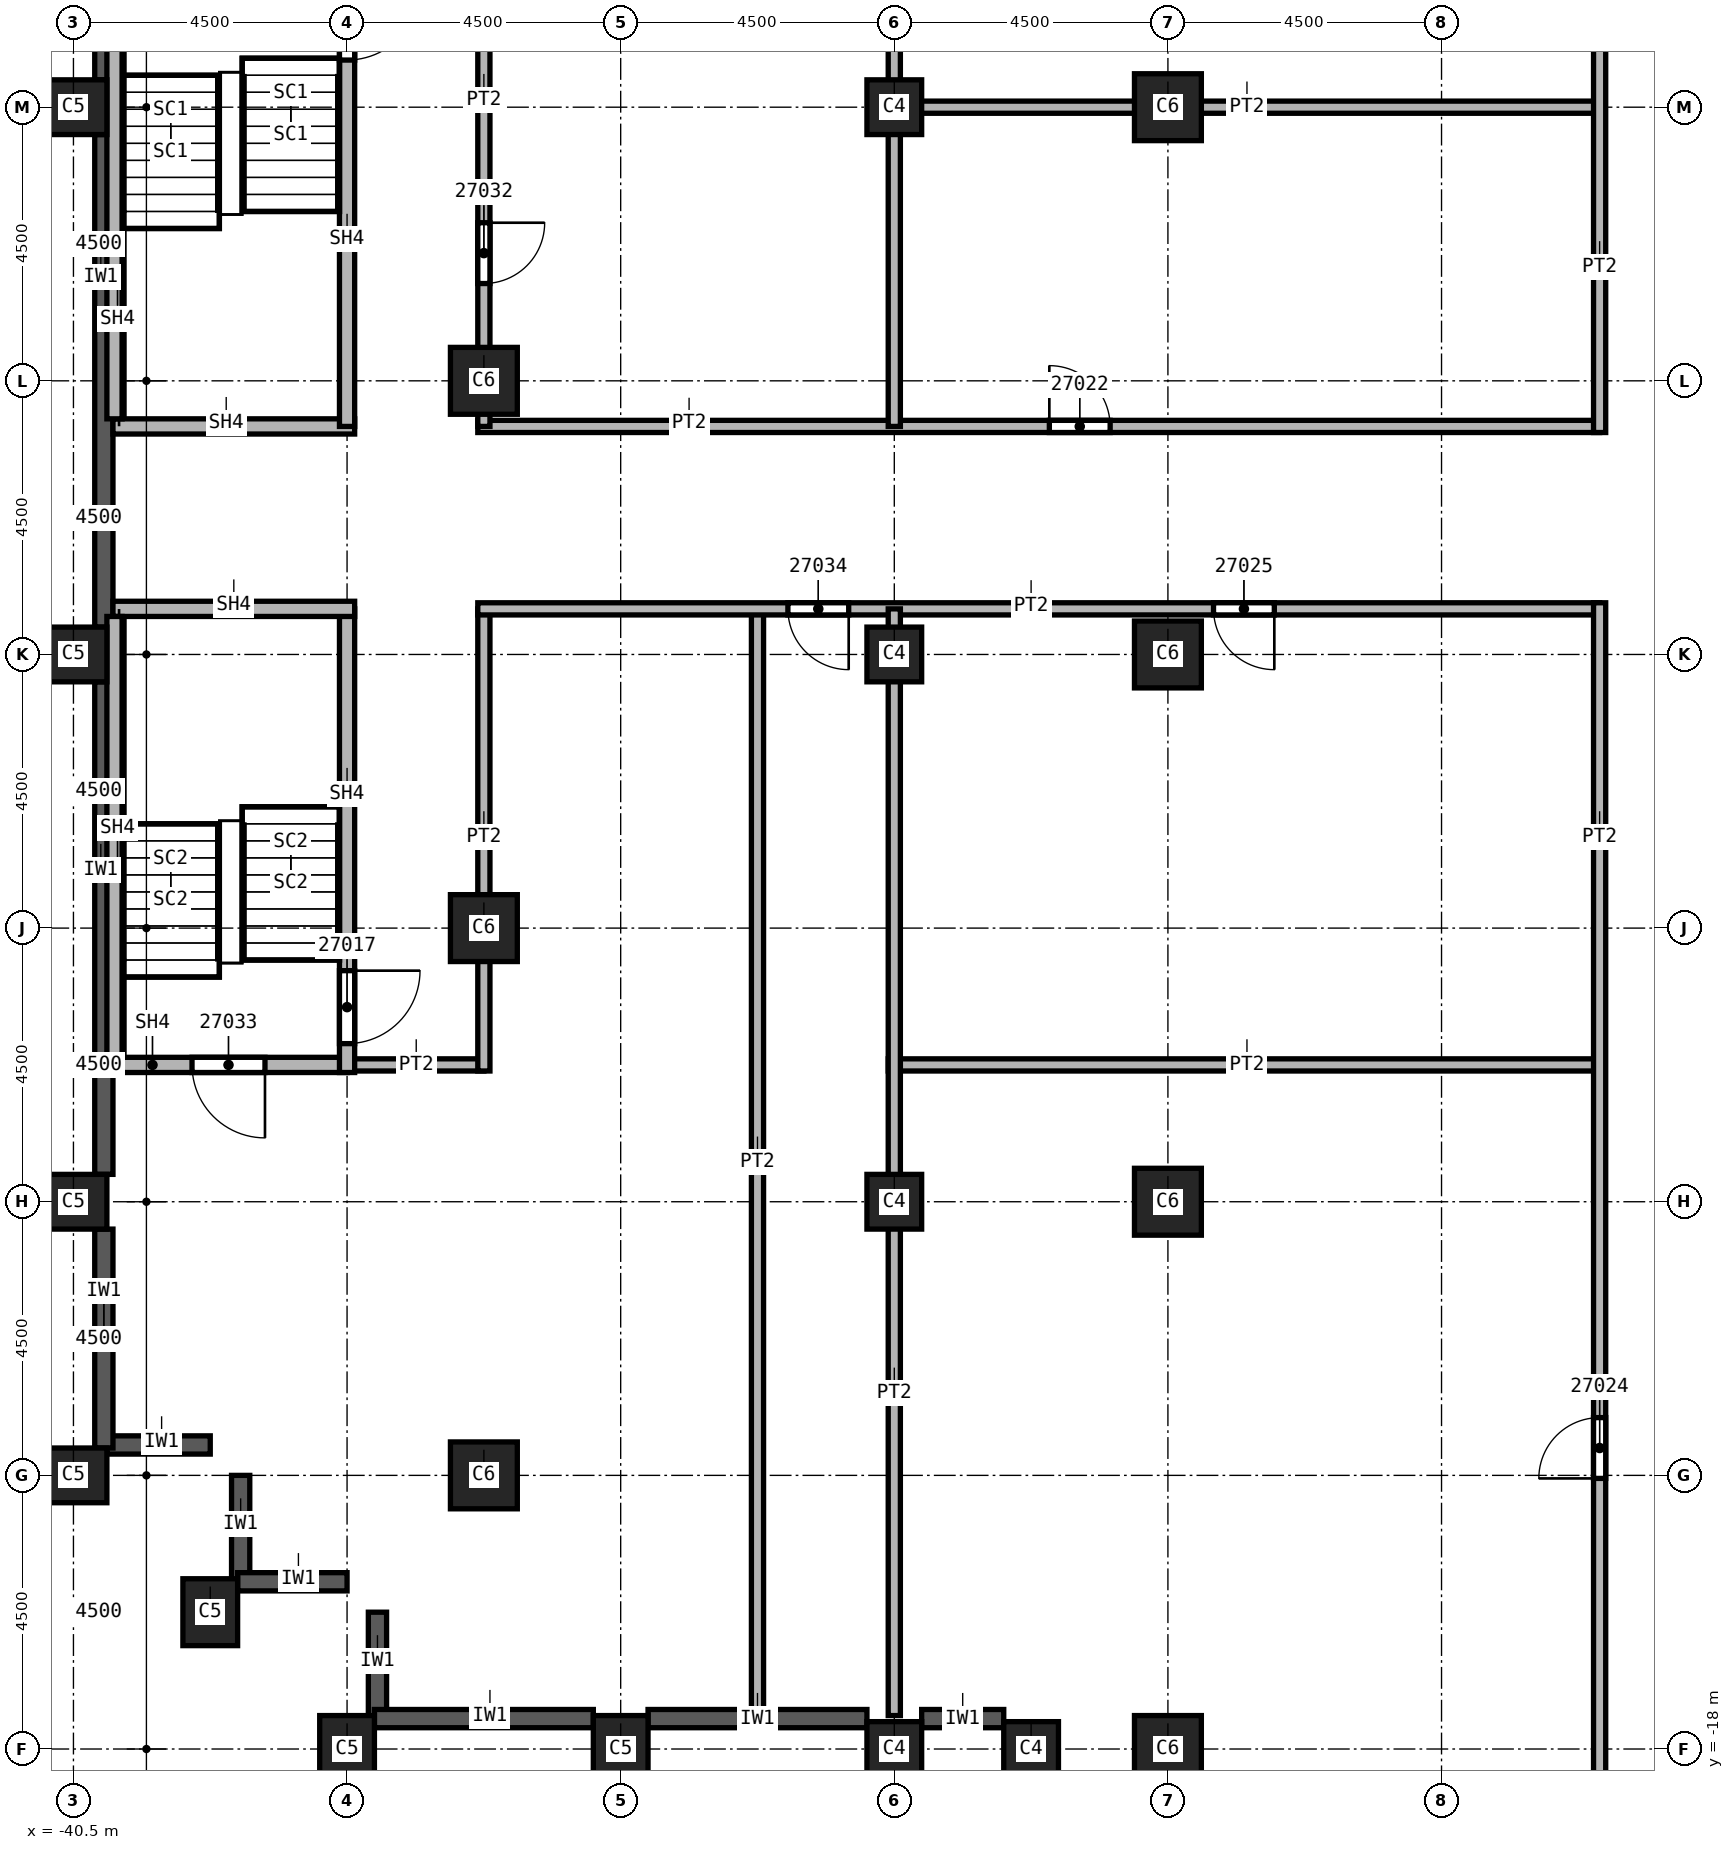
"""IFC4 building model, lengths in metres.
Left out: names, types, materials, properties, quantities, classifications, styles, units other than length and angle.
Written with IfcOpenShell. Run it as: python <this file> out.ifc"""

import sys

from ifc_helpers import new_model, si_unit, direction, frame, frame_2d, origin, origin_2d, place, context, subcontext, project, spatial, rectangle, extrude, element, fill, save


model = new_model("IFC4")
c1 = context("Model", 3, precision=1e-05, world=origin(), true_north=direction((0.0, 1.0)))
c2 = subcontext(c1, "Body", "Model", "MODEL_VIEW")
j1 = project(units=[si_unit("LENGTHUNIT", "METRE"), si_unit("PLANEANGLEUNIT", "RADIAN")], contexts=[c1])
p1 = place(None, origin())
s1 = spatial("IfcSite", under=j1, at=p1, CompositionType="ELEMENT")
p2 = place(p1, origin())
s2 = spatial("IfcBuilding", under=s1, at=p2, CompositionType="ELEMENT")
p3 = place(p2, frame((0.0, 0.0, 178.0)))
s3 = spatial("IfcBuildingStorey", under=s2, at=p3, CompositionType="ELEMENT", Elevation=178.0)
for number, where, z_axis, x_axis in (
    (1, (-40.5, 0.0, 0.0), (0.0, 0.0, 1.0), (0.0, 1.0, 0.0)),
    (2, (-40.5, 9.0, 0.0), (0.0, 0.0, 1.0), (0.0, 1.0, 0.0)),
    (3, (-40.5, -9.0, 0.0), (0.0, 0.0, 1.0), (0.0, 1.0, 0.0)),
    (4, (-40.5, -13.5, 0.0), (0.0, 0.0, 1.0), (0.0, 1.0, 0.0)),
    (5, (-38.25, -15.75, 0.0), (0.0, 0.0, 1.0), (1.0, 0.0, 0.0)),
    (6, (-31.5, -18.0, 0.0), (0.0, 0.0, 1.0), (1.0, 0.0, 0.0)),
    (7, (-36.0, -18.0, 0.0), (0.0, 0.0, 1.0), (1.0, 0.0, 0.0)),
):
    element("IfcColumn", number, at=place(p3, frame(where, z_axis=z_axis, x_axis=x_axis)), inside=s3, PredefinedType="COLUMN", context=c2, shape_type="SweptSolid", body=[
        extrude(rectangle(XDim=0.9, YDim=1.1, at=origin_2d()), origin(), (0.0, 0.0, 1.0), 5.72),
    ])
for number, where, z_axis, x_axis in (
    (8, (-33.75, 4.5, 0.0), (0.0, 0.0, 1.0), (1.0, 0.0, 0.0)),
    (9, (-33.75, -4.5, 0.0), (0.0, 0.0, 1.0), (1.0, 0.0, 0.0)),
    (10, (-33.75, -13.5, 0.0), (0.0, 0.0, 1.0), (1.0, 0.0, 0.0)),
    (11, (-22.5, 0.0, 0.0), (0.0, 0.0, 1.0), (1.0, 0.0, 0.0)),
    (12, (-22.5, 9.0, 0.0), (0.0, 0.0, 1.0), (1.0, 0.0, 0.0)),
    (13, (-22.5, -9.0, 0.0), (0.0, 0.0, 1.0), (1.0, 0.0, 0.0)),
    (14, (-22.5, -18.0, 0.0), (0.0, 0.0, 1.0), (1.0, 0.0, 0.0)),
):
    element("IfcColumn", number, at=place(p3, frame(where, z_axis=z_axis, x_axis=x_axis)), inside=s3, PredefinedType="COLUMN", context=c2, shape_type="SweptSolid", body=[
        extrude(rectangle(XDim=1.1, YDim=1.1, at=origin_2d()), origin(), (0.0, 0.0, 1.0), 5.72),
    ])
for number, where, z_axis, x_axis in (
    (15, (-27.0, 0.0, 0.0), (0.0, 0.0, 1.0), (1.0, 0.0, 0.0)),
    (16, (-27.0, 9.0, 0.0), (0.0, 0.0, 1.0), (1.0, 0.0, 0.0)),
    (17, (-27.0, -9.0, 0.0), (0.0, 0.0, 1.0), (1.0, 0.0, 0.0)),
    (18, (-27.0, -18.0, 0.0), (0.0, 0.0, 1.0), (1.0, 0.0, 0.0)),
    (19, (-24.75, -18.0, 0.0), (0.0, 0.0, 1.0), (1.0, 0.0, 0.0)),
):
    element("IfcColumn", number, at=place(p3, frame(where, z_axis=z_axis, x_axis=x_axis)), inside=s3, PredefinedType="COLUMN", context=c2, shape_type="SweptSolid", body=[
        extrude(rectangle(XDim=0.9, YDim=0.9, at=origin_2d()), origin(), (0.0, 0.0, 1.0), 5.72),
    ])
p4 = place(p3, frame((-39.95, -13.0, 0.0), z_axis=(0.0, 0.0, 1.0), x_axis=(1.0, 0.0, 0.0)))
e20 = element("IfcWall", 20, at=p4, inside=s3, PredefinedType="SOLIDWALL", context=c2, shape_type="SweptSolid", body=[
    extrude(rectangle(XDim=1.7, YDim=0.3, at=frame_2d((0.85, 0.0))), origin(), (0.0, 0.0, 1.0), 5.12),
])
for number, where, z_axis, x_axis in (
    (21, (-37.75, -15.3, 0.0), (0.0, 0.0, 1.0), (0.0, 1.0, 0.0)),
    (22, (-37.8, -15.25, 0.0), (0.0, 0.0, 1.0), (1.0, 0.0, 0.0)),
    (23, (-35.5, -17.55, 0.0), (0.0, 0.0, 1.0), (0.0, 1.0, 0.0)),
):
    element("IfcWall", number, at=place(p3, frame(where, z_axis=z_axis, x_axis=x_axis)), inside=s3, PredefinedType="SOLIDWALL", context=c2, shape_type="SweptSolid", body=[
        extrude(rectangle(XDim=1.8, YDim=0.3, at=frame_2d((0.9, 0.0))), origin(), (0.0, 0.0, 1.0), 5.12),
    ])
p5 = place(p3, frame((-40.0, 13.05, 0.0), z_axis=(0.0, 0.0, 1.0), x_axis=(0.0, -1.0, 0.0)))
e24 = element("IfcWall", 24, at=p5, inside=s3, PredefinedType="SOLIDWALL", context=c2, shape_type="SweptSolid", body=[
    extrude(rectangle(XDim=3.6, YDim=0.3, at=frame_2d((1.8, 0.0))), origin(), (0.0, 0.0, 1.0), 5.12),
])
for number, where, z_axis, x_axis in (
    (25, (-40.0, 8.55, 0.0), (0.0, 0.0, 1.0), (0.0, -1.0, 0.0)),
    (26, (-40.0, -0.45, 0.0), (0.0, 0.0, 1.0), (0.0, -1.0, 0.0)),
):
    element("IfcWall", number, at=place(p3, frame(where, z_axis=z_axis, x_axis=x_axis)), inside=s3, PredefinedType="SOLIDWALL", context=c2, shape_type="SweptSolid", body=[
        extrude(rectangle(XDim=8.1, YDim=0.3, at=frame_2d((4.05, 0.0))), origin(), (0.0, 0.0, 1.0), 5.12),
    ])
for number, where, z_axis, x_axis in (
    (27, (-40.0, -9.45, 0.0), (0.0, 0.0, 1.0), (0.0, -1.0, 0.0)),
    (28, (-35.55, -17.5, 0.0), (0.0, 0.0, 1.0), (1.0, 0.0, 0.0)),
    (29, (-31.05, -17.5, 0.0), (0.0, 0.0, 1.0), (1.0, 0.0, 0.0)),
):
    element("IfcWall", number, at=place(p3, frame(where, z_axis=z_axis, x_axis=x_axis)), inside=s3, PredefinedType="SOLIDWALL", context=c2, shape_type="SweptSolid", body=[
        extrude(rectangle(XDim=3.6, YDim=0.3, at=frame_2d((1.8, 0.0))), origin(), (0.0, 0.0, 1.0), 5.12),
    ])
p6 = place(p3, frame((-26.55, -17.5, 0.0), z_axis=(0.0, 0.0, 1.0), x_axis=(1.0, 0.0, 0.0)))
e30 = element("IfcWall", 30, at=p6, inside=s3, PredefinedType="SOLIDWALL", context=c2, shape_type="SweptSolid", body=[
    extrude(rectangle(XDim=1.35, YDim=0.3, at=frame_2d((0.675, 0.0))), origin(), (0.0, 0.0, 1.0), 5.12),
])
p7 = place(p3, frame((-33.85, 3.75, 0.0), z_axis=(0.0, 0.0, 1.0), x_axis=(1.0, 0.0, 0.0)))
e31 = element("IfcWall", 31, at=p7, inside=s3, PredefinedType="PARTITIONING", context=c2, shape_type="SweptSolid", body=[
    extrude(rectangle(XDim=18.45, YDim=0.2, at=frame_2d((9.225, 0.0))), origin(), (0.0, 0.0, 1.0), 5.72),
])
p8 = place(p7, frame((9.4, 0.0, 0.0)))
e32 = element("IfcOpeningElement", 32, at=p8, cuts=e31, PredefinedType="OPENING", context=c2, shape_type="SweptSolid", body=[
    extrude(rectangle(XDim=1.0, YDim=2.1, at=frame_2d((0.5, 1.05))), frame((0.0, 0.1, 0.0), z_axis=(0.0, -1.0, 0.0), x_axis=(1.0, 0.0, 0.0)), (0.0, 0.0, 1.0), 0.2),
])
p9 = place(p3, frame((-33.75, -6.75, 0.0), z_axis=(0.0, 0.0, 1.0), x_axis=(-1.0, 0.0, 0.0)))
e33 = element("IfcWall", 33, at=p9, inside=s3, PredefinedType="PARTITIONING", context=c2, shape_type="SweptSolid", body=[
    extrude(rectangle(XDim=2.25, YDim=0.2, at=frame_2d((1.125, 0.0))), origin(), (0.0, 0.0, 1.0), 5.72),
])
p10 = place(p3, frame((-33.75, 0.75, 0.0), z_axis=(0.0, 0.0, 1.0), x_axis=(0.0, -1.0, 0.0)))
e34 = element("IfcWall", 34, at=p10, inside=s3, PredefinedType="PARTITIONING", context=c2, shape_type="SweptSolid", body=[
    extrude(rectangle(XDim=7.6, YDim=0.2, at=frame_2d((3.8, 0.0))), origin(), (0.0, 0.0, 1.0), 5.72),
])
p11 = place(p3, frame((-33.75, 11.25, 0.0), z_axis=(0.0, 0.0, 1.0), x_axis=(0.0, -1.0, 0.0)))
e35 = element("IfcWall", 35, at=p11, inside=s3, PredefinedType="PARTITIONING", context=c2, shape_type="SweptSolid", body=[
    extrude(rectangle(XDim=7.5, YDim=0.2, at=frame_2d((3.75, 0.0))), origin(), (0.0, 0.0, 1.0), 5.72),
])
p12 = place(p11, frame((4.15, 0.0, 0.0)))
e36 = element("IfcOpeningElement", 36, at=p12, cuts=e35, PredefinedType="OPENING", context=c2, shape_type="SweptSolid", body=[
    extrude(rectangle(XDim=1.0, YDim=2.1, at=frame_2d((0.5, 1.05))), frame((0.0, 0.1, 0.0), z_axis=(0.0, -1.0, 0.0), x_axis=(1.0, 0.0, 0.0)), (0.0, 0.0, 1.0), 0.2),
])
p13 = place(p3, frame((-29.25, 0.75, 0.0), z_axis=(0.0, 0.0, 1.0), x_axis=(0.0, -1.0, 0.0)))
e37 = element("IfcWall", 37, at=p13, inside=s3, PredefinedType="PARTITIONING", context=c2, shape_type="SweptSolid", body=[
    extrude(rectangle(XDim=18.1, YDim=0.2, at=frame_2d((9.05, 0.0))), origin(), (0.0, 0.0, 1.0), 5.72),
])
p14 = place(p3, frame((-15.4, 0.75, 0.0), z_axis=(0.0, 0.0, 1.0), x_axis=(-1.0, 0.0, 0.0)))
e38 = element("IfcWall", 38, at=p14, inside=s3, PredefinedType="PARTITIONING", context=c2, shape_type="SweptSolid", body=[
    extrude(rectangle(XDim=18.45, YDim=0.2, at=frame_2d((9.225, 0.0))), origin(), (0.0, 0.0, 1.0), 5.72),
])
p15 = place(p14, frame((5.35, 0.0, 0.0)))
e39 = element("IfcOpeningElement", 39, at=p15, cuts=e38, PredefinedType="OPENING", context=c2, shape_type="SweptSolid", body=[
    extrude(rectangle(XDim=1.0, YDim=2.1, at=frame_2d((0.5, 1.05))), frame((0.0, 0.1, 0.0), z_axis=(0.0, -1.0, 0.0), x_axis=(1.0, 0.0, 0.0)), (0.0, 0.0, 1.0), 0.2),
])
p16 = place(p14, frame((12.35, 0.0, 0.0)))
e40 = element("IfcOpeningElement", 40, at=p16, cuts=e38, PredefinedType="OPENING", context=c2, shape_type="SweptSolid", body=[
    extrude(rectangle(XDim=1.0, YDim=2.1, at=frame_2d((0.5, 1.05))), frame((0.0, 0.1, 0.0), z_axis=(0.0, -1.0, 0.0), x_axis=(1.0, 0.0, 0.0)), (0.0, 0.0, 1.0), 0.2),
])
for number, where, z_axis, x_axis in (
    (41, (-27.1, -6.75, 0.0), (0.0, 0.0, 1.0), (1.0, 0.0, 0.0)),
    (42, (-27.1, 9.0, 0.0), (0.0, 0.0, 1.0), (1.0, 0.0, 0.0)),
):
    element("IfcWall", number, at=place(p3, frame(where, z_axis=z_axis, x_axis=x_axis)), inside=s3, PredefinedType="PARTITIONING", context=c2, shape_type="SweptSolid", body=[
        extrude(rectangle(XDim=11.7, YDim=0.2, at=frame_2d((5.85, 0.0))), origin(), (0.0, 0.0, 1.0), 5.72),
    ])
p17 = place(p3, frame((-27.0, -17.45, 0.0), z_axis=(0.0, 0.0, 1.0), x_axis=(0.0, 1.0, 0.0)))
e43 = element("IfcWall", 43, at=p17, inside=s3, PredefinedType="PARTITIONING", context=c2, shape_type="SweptSolid", body=[
    extrude(rectangle(XDim=18.2, YDim=0.2, at=frame_2d((9.1, 0.0))), origin(), (0.0, 0.0, 1.0), 5.72),
])
p18 = place(p3, frame((-27.0, 3.75, 0.0), z_axis=(0.0, 0.0, 1.0), x_axis=(0.0, 1.0, 0.0)))
e44 = element("IfcWall", 44, at=p18, inside=s3, PredefinedType="PARTITIONING", context=c2, shape_type="SweptSolid", body=[
    extrude(rectangle(XDim=13.7, YDim=0.2, at=frame_2d((6.85, 0.0))), origin(), (0.0, 0.0, 1.0), 5.72),
])
p19 = place(p3, frame((-15.4, -22.95, 0.0), z_axis=(0.0, 0.0, 1.0), x_axis=(0.0, 1.0, 0.0)))
e45 = element("IfcWall", 45, at=p19, inside=s3, PredefinedType="PARTITIONING", context=c2, shape_type="SweptSolid", body=[
    extrude(rectangle(XDim=23.8, YDim=0.2, at=frame_2d((11.9, 0.0))), origin(), (0.0, 0.0, 1.0), 5.72),
])
p20 = place(p19, frame((9.4, 0.0, 0.0)))
e46 = element("IfcOpeningElement", 46, at=p20, cuts=e45, PredefinedType="OPENING", context=c2, shape_type="SweptSolid", body=[
    extrude(rectangle(XDim=1.0, YDim=2.1, at=frame_2d((0.5, 1.05))), frame((0.0, 0.1, 0.0), z_axis=(0.0, -1.0, 0.0), x_axis=(1.0, 0.0, 0.0)), (0.0, 0.0, 1.0), 0.2),
])
p21 = place(p3, frame((-15.4, 3.65, 0.0), z_axis=(0.0, 0.0, 1.0), x_axis=(0.0, 1.0, 0.0)))
e47 = element("IfcWall", 47, at=p21, inside=s3, PredefinedType="PARTITIONING", context=c2, shape_type="SweptSolid", body=[
    extrude(rectangle(XDim=9.95, YDim=0.2, at=frame_2d((4.975, 0.0))), origin(), (0.0, 0.0, 1.0), 5.72),
])
p22 = place(p3, frame((-39.85, 3.75, 0.0), z_axis=(0.0, 0.0, 1.0), x_axis=(1.0, 0.0, 0.0)))
e48 = element("IfcWall", 48, at=p22, inside=s3, PredefinedType="SOLIDWALL", context=c2, shape_type="SweptSolid", body=[
    extrude(rectangle(XDim=3.975, YDim=0.25, at=frame_2d((1.988, 0.0))), origin(), (0.0, 0.0, 1.0), 5.72),
])
p23 = place(p3, frame((-36.0, -6.75, 0.0), z_axis=(0.0, 0.0, 1.0), x_axis=(-1.0, 0.0, 0.0)))
e49 = element("IfcWall", 49, at=p23, inside=s3, PredefinedType="SOLIDWALL", context=c2, shape_type="SweptSolid", body=[
    extrude(rectangle(XDim=3.85, YDim=0.25, at=frame_2d((1.925, 0.0))), origin(), (0.0, 0.0, 1.0), 5.72),
])
p24 = place(p23, frame((1.35, 0.0, 0.0)))
e50 = element("IfcOpeningElement", 50, at=p24, cuts=e49, PredefinedType="OPENING", context=c2, shape_type="SweptSolid", body=[
    extrude(rectangle(XDim=1.2, YDim=2.1, at=frame_2d((0.6, 1.05))), frame((0.0, 0.125, 0.0), z_axis=(0.0, -1.0, 0.0), x_axis=(1.0, 0.0, 0.0)), (0.0, 0.0, 1.0), 0.25),
])
p25 = place(p3, frame((-36.0, 0.75, 0.0), z_axis=(0.0, 0.0, 1.0), x_axis=(0.0, -1.0, 0.0)))
e51 = element("IfcWall", 51, at=p25, inside=s3, PredefinedType="SOLIDWALL", context=c2, shape_type="SweptSolid", body=[
    extrude(rectangle(XDim=7.625, YDim=0.25, at=frame_2d((3.812, 0.0))), origin(), (0.0, 0.0, 1.0), 5.72),
])
p26 = place(p25, frame((5.95, 0.0, 0.0)))
e52 = element("IfcOpeningElement", 52, at=p26, cuts=e51, PredefinedType="OPENING", context=c2, shape_type="SweptSolid", body=[
    extrude(rectangle(XDim=1.2, YDim=2.1, at=frame_2d((0.6, 1.05))), frame((0.0, 0.125, 0.0), z_axis=(0.0, -1.0, 0.0), x_axis=(1.0, 0.0, 0.0)), (0.0, 0.0, 1.0), 0.25),
])
p27 = place(p3, frame((-36.0, 11.375, 0.0), z_axis=(0.0, 0.0, 1.0), x_axis=(0.0, -1.0, 0.0)))
e53 = element("IfcWall", 53, at=p27, inside=s3, PredefinedType="SOLIDWALL", context=c2, shape_type="SweptSolid", body=[
    extrude(rectangle(XDim=7.625, YDim=0.25, at=frame_2d((3.812, 0.0))), origin(), (0.0, 0.0, 1.0), 5.72),
])
p28 = place(p27, frame((0.4, 0.0, 0.0)))
e54 = element("IfcOpeningElement", 54, at=p28, cuts=e53, PredefinedType="OPENING", context=c2, shape_type="SweptSolid", body=[
    extrude(rectangle(XDim=1.2, YDim=2.1, at=frame_2d((0.6, 1.05))), frame((0.0, 0.125, 0.0), z_axis=(0.0, -1.0, 0.0), x_axis=(1.0, 0.0, 0.0)), (0.0, 0.0, 1.0), 0.25),
])
p29 = place(p3, frame((-35.875, 0.75, 0.0), z_axis=(0.0, 0.0, 1.0), x_axis=(-1.0, 0.0, 0.0)))
e55 = element("IfcWall", 55, at=p29, inside=s3, PredefinedType="SOLIDWALL", context=c2, shape_type="SweptSolid", body=[
    extrude(rectangle(XDim=3.975, YDim=0.25, at=frame_2d((1.988, 0.0))), origin(), (0.0, 0.0, 1.0), 5.72),
])
for number, where, z_axis, x_axis in (
    (56, (-39.825, 3.875, 0.0), (0.0, 0.0, 1.0), (0.0, 1.0, 0.0)),
    (57, (-39.825, -6.625, 0.0), (0.0, 0.0, 1.0), (0.0, 1.0, 0.0)),
):
    element("IfcWall", number, at=place(p3, frame(where, z_axis=z_axis, x_axis=x_axis)), inside=s3, PredefinedType="SOLIDWALL", context=c2, shape_type="SweptSolid", body=[
        extrude(rectangle(XDim=7.25, YDim=0.25, at=frame_2d((3.625, 0.0))), origin(), (0.0, 0.0, 1.0), 5.72),
    ])
p30 = place(p28, origin())
e58 = element("IfcDoor", 58, at=p30, inside=s3, OperationType="SINGLE_SWING_LEFT", PredefinedType="DOOR", context=c2, shape_type="SweptSolid", body=[
    extrude(rectangle(XDim=1.2, YDim=2.1, at=frame_2d((0.6, 1.05))), frame((0.0, 0.025, 0.0), z_axis=(0.0, -1.0, 0.0), x_axis=(1.0, 0.0, 0.0)), (0.0, 0.0, 1.0), 0.05),
])
fill(e54, e58)
p31 = place(p26, origin())
e59 = element("IfcDoor", 59, at=p31, inside=s3, OperationType="SINGLE_SWING_RIGHT", PredefinedType="DOOR", context=c2, shape_type="SweptSolid", body=[
    extrude(rectangle(XDim=1.2, YDim=2.1, at=frame_2d((0.6, 1.05))), frame((0.0, 0.025, 0.0), z_axis=(0.0, -1.0, 0.0), x_axis=(1.0, 0.0, 0.0)), (0.0, 0.0, 1.0), 0.05),
])
fill(e52, e59)
p32 = place(p8, origin())
e60 = element("IfcDoor", 60, at=p32, inside=s3, OperationType="SINGLE_SWING_LEFT", PredefinedType="DOOR", context=c2, shape_type="SweptSolid", body=[
    extrude(rectangle(XDim=1.0, YDim=2.1, at=frame_2d((0.5, 1.05))), frame((0.0, 0.025, 0.0), z_axis=(0.0, -1.0, 0.0), x_axis=(1.0, 0.0, 0.0)), (0.0, 0.0, 1.0), 0.05),
])
fill(e32, e60)
p33 = place(p20, origin())
e61 = element("IfcDoor", 61, at=p33, inside=s3, OperationType="SINGLE_SWING_LEFT", PredefinedType="DOOR", context=c2, shape_type="SweptSolid", body=[
    extrude(rectangle(XDim=1.0, YDim=2.1, at=frame_2d((0.5, 1.05))), frame((0.0, 0.025, 0.0), z_axis=(0.0, -1.0, 0.0), x_axis=(1.0, 0.0, 0.0)), (0.0, 0.0, 1.0), 0.05),
])
fill(e46, e61)
p34 = place(p15, origin())
e62 = element("IfcDoor", 62, at=p34, inside=s3, OperationType="SINGLE_SWING_RIGHT", PredefinedType="DOOR", context=c2, shape_type="SweptSolid", body=[
    extrude(rectangle(XDim=1.0, YDim=2.1, at=frame_2d((0.5, 1.05))), frame((0.0, 0.025, 0.0), z_axis=(0.0, -1.0, 0.0), x_axis=(1.0, 0.0, 0.0)), (0.0, 0.0, 1.0), 0.05),
])
fill(e39, e62)
p35 = place(p12, origin())
e63 = element("IfcDoor", 63, at=p35, inside=s3, OperationType="SINGLE_SWING_LEFT", PredefinedType="DOOR", context=c2, shape_type="SweptSolid", body=[
    extrude(rectangle(XDim=1.0, YDim=2.1, at=frame_2d((0.5, 1.05))), frame((0.0, 0.025, 0.0), z_axis=(0.0, -1.0, 0.0), x_axis=(1.0, 0.0, 0.0)), (0.0, 0.0, 1.0), 0.05),
])
fill(e36, e63)
p36 = place(p24, origin())
e64 = element("IfcDoor", 64, at=p36, inside=s3, OperationType="SINGLE_SWING_RIGHT", PredefinedType="DOOR", context=c2, shape_type="SweptSolid", body=[
    extrude(rectangle(XDim=1.2, YDim=2.1, at=frame_2d((0.6, 1.05))), frame((0.0, 0.025, 0.0), z_axis=(0.0, -1.0, 0.0), x_axis=(1.0, 0.0, 0.0)), (0.0, 0.0, 1.0), 0.05),
])
fill(e50, e64)
p37 = place(p16, origin())
e65 = element("IfcDoor", 65, at=p37, inside=s3, OperationType="SINGLE_SWING_LEFT", PredefinedType="DOOR", context=c2, shape_type="SweptSolid", body=[
    extrude(rectangle(XDim=1.0, YDim=2.1, at=frame_2d((0.5, 1.05))), frame((0.0, 0.025, 0.0), z_axis=(0.0, -1.0, 0.0), x_axis=(1.0, 0.0, 0.0)), (0.0, 0.0, 1.0), 0.05),
])
fill(e40, e65)
save(model, sys.argv[1])
